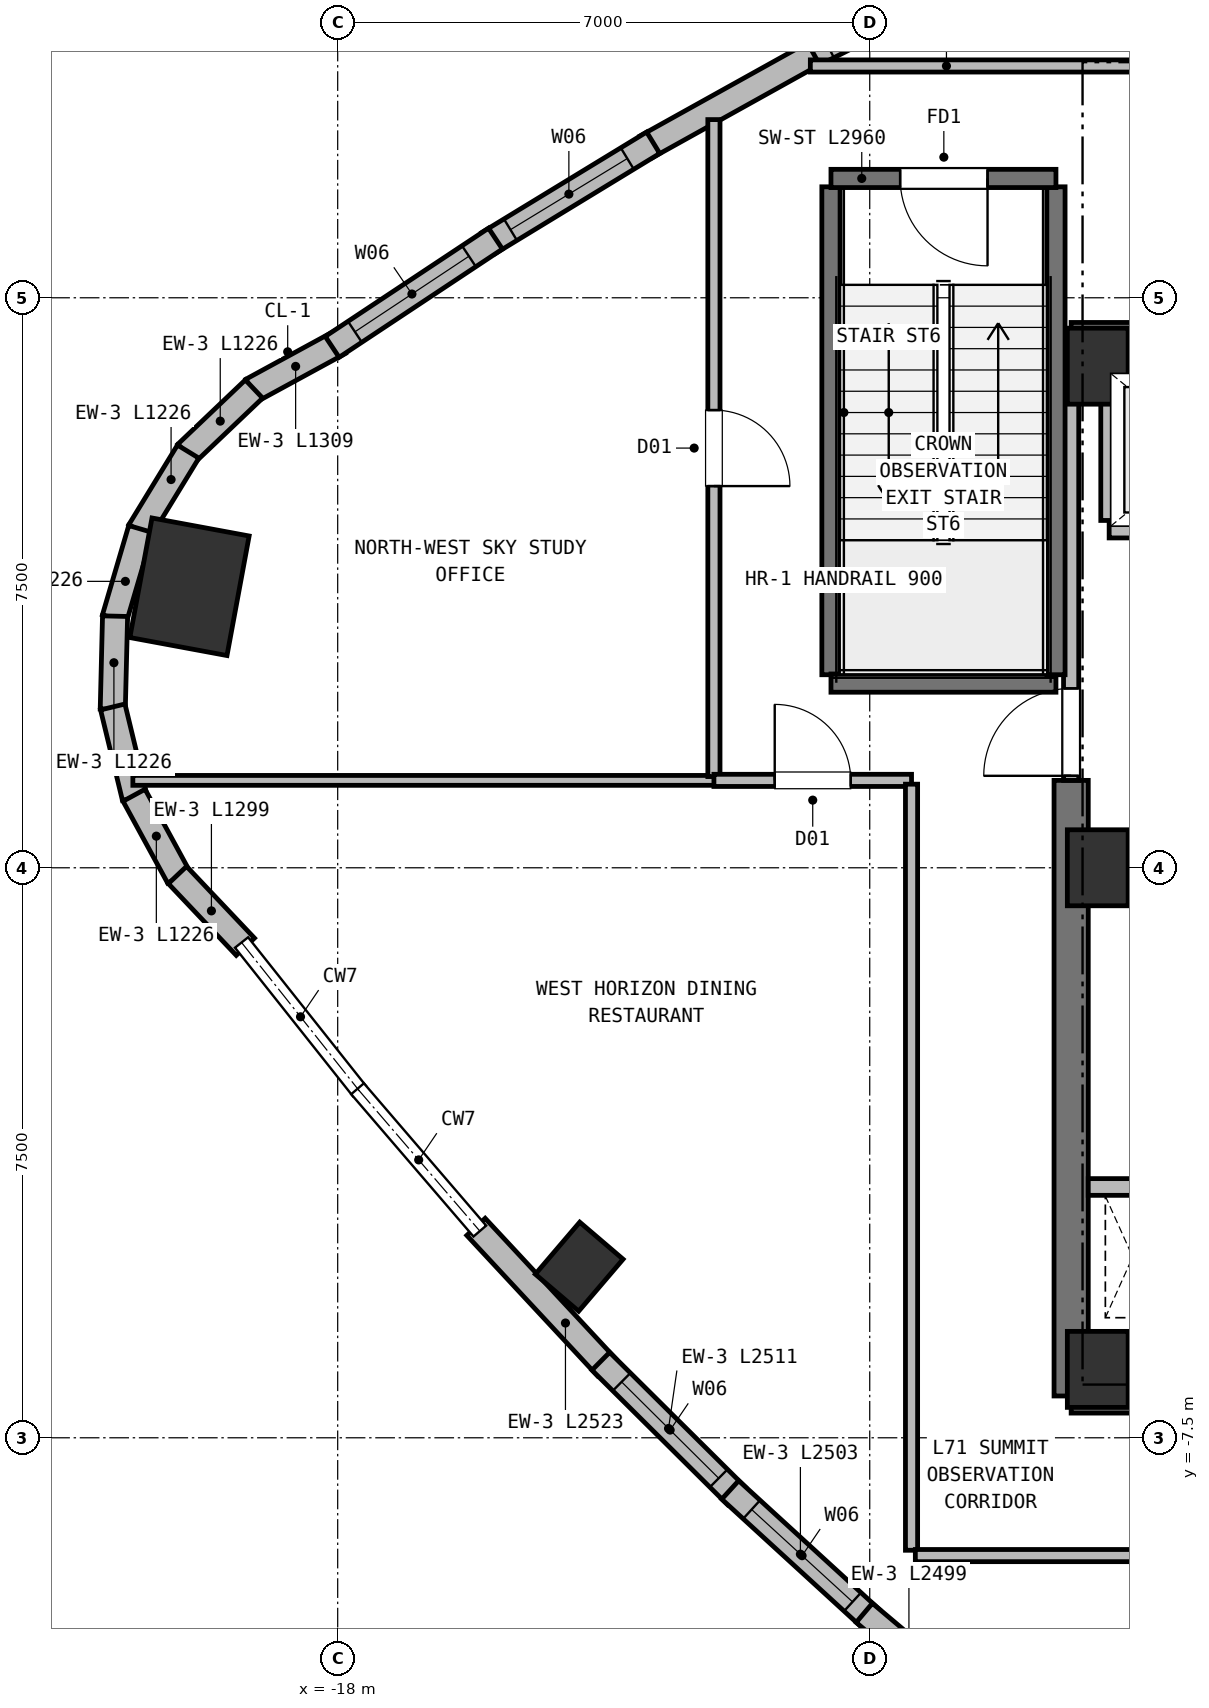
"""IFC4 building model, lengths in metres.
Left out: names, types, materials, properties, quantities, classifications, styles, units other than length and angle.
Written with IfcOpenShell. Run it as: python <this file> out.ifc"""

import sys

from ifc_helpers import new_model, si_unit, direction, frame, frame_2d, origin, origin_2d, place, context, subcontext, project, spatial, rectangle, extrude, element, fill, save


model = new_model("IFC4")
c1 = context("Model", 3, precision=1e-05, world=origin(), true_north=direction((0.0, 1.0)))
c2 = subcontext(c1, "Body", "Model", "MODEL_VIEW")
j1 = project(units=[si_unit("LENGTHUNIT", "METRE"), si_unit("PLANEANGLEUNIT", "RADIAN")], contexts=[c1])
p1 = place(None, origin())
s1 = spatial("IfcSite", under=j1, at=p1, CompositionType="ELEMENT")
p2 = place(p1, origin())
s2 = spatial("IfcBuilding", under=s1, at=p2, CompositionType="ELEMENT")
p3 = place(p2, frame((0.0, 0.0, 286.0)))
s3 = spatial("IfcBuildingStorey", under=s2, at=p3, CompositionType="ELEMENT", Elevation=286.0)
for number, where, z_axis, x_axis in (
    (1, (-8.0, -6.6, 0.0), (0.0, 0.0, 1.0), (1.0, 0.0, 0.0)),
    (2, (-8.0, 6.6, 0.0), (0.0, 0.0, 1.0), (1.0, 0.0, 0.0)),
    (3, (-8.0, 0.0, 0.0), (0.0, 0.0, 1.0), (1.0, 0.0, 0.0)),
):
    element("IfcColumn", number, at=place(p3, frame(where, z_axis=z_axis, x_axis=x_axis)), inside=s3, PredefinedType="COLUMN", context=c2, shape_type="SweptSolid", body=[
        extrude(rectangle(XDim=0.8, YDim=1.0, at=origin_2d()), origin(), (0.0, 0.0, 1.0), 4.4),
    ])
p4 = place(p3, frame((-8.35, 6.95, 0.0), z_axis=(0.0, 0.0, 1.0), x_axis=(1.0, 0.0, 0.0)))
e4 = element("IfcWall", 4, at=p4, inside=s3, PredefinedType="SHEAR", context=c2, shape_type="SweptSolid", body=[
    extrude(rectangle(XDim=16.7, YDim=0.45, at=frame_2d((8.35, 0.0))), origin(), (0.0, 0.0, 1.0), 4.13),
])
p5 = place(p3, frame((-8.35, -6.95, 0.0), z_axis=(0.0, 0.0, 1.0), x_axis=(1.0, 0.0, 0.0)))
e5 = element("IfcWall", 5, at=p5, inside=s3, PredefinedType="SHEAR", context=c2, shape_type="SweptSolid", body=[
    extrude(rectangle(XDim=3.95, YDim=0.45, at=frame_2d((1.975, 0.0))), origin(), (0.0, 0.0, 1.0), 4.13),
])
p6 = place(p3, frame((-8.35, -6.95, 0.0), z_axis=(0.0, 0.0, 1.0), x_axis=(0.0, 1.0, 0.0)))
e6 = element("IfcWall", 6, at=p6, inside=s3, PredefinedType="SHEAR", context=c2, shape_type="SweptSolid", body=[
    extrude(rectangle(XDim=8.1, YDim=0.45, at=frame_2d((4.05, 0.0))), origin(), (0.0, 0.0, 1.0), 4.13),
])
p7 = place(p3, frame((-19.95, 3.698, 0.0), z_axis=(0.0, 0.0, 1.0), x_axis=(-0.983254907564, 0.182235525492, 0.0)))
e7 = element("IfcColumn", 7, at=p7, inside=s3, PredefinedType="COLUMN", context=c2, shape_type="SweptSolid", body=[
    extrude(rectangle(XDim=1.3, YDim=1.6, at=origin_2d()), origin(), (0.0, 0.0, 1.0), 4.4),
])
p8 = place(p3, frame((-14.823, -5.249, 0.0), z_axis=(0.0, 0.0, 1.0), x_axis=(-0.7604059656, 0.64944804833, 0.0)))
e8 = element("IfcColumn", 8, at=p8, inside=s3, PredefinedType="COLUMN", context=c2, shape_type="SweptSolid", body=[
    extrude(rectangle(XDim=0.75, YDim=0.9, at=origin_2d()), origin(), (0.0, 0.0, 1.0), 4.4),
])
p9 = place(p3, frame((-19.128, 6.284, 0.0), z_axis=(0.0, 0.0, 1.0), x_axis=(0.878173375728, 0.478342473719, 0.0)))
e9 = element("IfcWall", 9, at=p9, inside=s3, PredefinedType="SOLIDWALL", context=c2, shape_type="SweptSolid", body=[
    extrude(rectangle(XDim=1.309, YDim=0.33, at=frame_2d((0.655, 0.0))), origin(), (0.0, 0.0, 1.0), 4.13),
])
for number, where, z_axis, x_axis in (
    (10, (-19.989, 5.454, 0.0), (0.0, 0.0, 1.0), (0.724, 0.69, 0.0)),
    (11, (-20.606, 4.43, 0.0), (0.0, 0.0, 1.0), (0.521, 0.853, 0.0)),
    (12, (-20.937, 3.281, 0.0), (0.0, 0.0, 1.0), (0.282, 0.959, 0.0)),
    (13, (-20.959, 2.085, 0.0), (0.0, 0.0, 1.0), (0.025, 1.0, 0.0)),
    (14, (-20.671, 0.924, 0.0), (0.0, 0.0, 1.0), (-0.235, 0.972, 0.0)),
):
    element("IfcWall", number, at=place(p3, frame(where, z_axis=z_axis, x_axis=x_axis)), inside=s3, PredefinedType="SOLIDWALL", context=c2, shape_type="SweptSolid", body=[
        extrude(rectangle(XDim=1.226, YDim=0.33, at=frame_2d((0.613, 0.0))), origin(), (0.0, 0.0, 1.0), 4.13),
    ])
p10 = place(p3, frame((-20.093, -0.122, 0.0), z_axis=(0.0, 0.0, 1.0), x_axis=(-0.478321862725, 0.878184602256, 0.0)))
e15 = element("IfcWall", 15, at=p10, inside=s3, PredefinedType="SOLIDWALL", context=c2, shape_type="SweptSolid", body=[
    extrude(rectangle(XDim=1.226, YDim=0.33, at=frame_2d((0.613, 0.0))), origin(), (0.0, 0.0, 1.0), 4.13),
])
p11 = place(p3, frame((-19.215, -1.039, 0.0), z_axis=(0.0, 0.0, 1.0), x_axis=(-0.687489239636, 0.726194564414, 0.0)))
e16 = element("IfcWall", 16, at=p11, inside=s3, PredefinedType="SOLIDWALL", context=c2, shape_type="SweptSolid", body=[
    extrude(rectangle(XDim=1.299, YDim=0.33, at=frame_2d((0.65, 0.0))), origin(), (0.0, 0.0, 1.0), 4.13),
])
p12 = place(p3, frame((-14.462, -6.572, 0.0), z_axis=(0.0, 0.0, 1.0), x_axis=(-0.681100323402, 0.732190104728, 0.0)))
e17 = element("IfcWall", 17, at=p12, inside=s3, PredefinedType="SOLIDWALL", context=c2, shape_type="SweptSolid", body=[
    extrude(rectangle(XDim=2.523, YDim=0.33, at=frame_2d((1.262, 0.0))), origin(), (0.0, 0.0, 1.0), 4.13),
])
p13 = place(p3, frame((-12.756, -8.262, 0.0), z_axis=(0.0, 0.0, 1.0), x_axis=(-0.709823779942, 0.704379302243, 0.0)))
e18 = element("IfcWall", 18, at=p13, inside=s3, PredefinedType="SOLIDWALL", context=c2, shape_type="SweptSolid", body=[
    extrude(rectangle(XDim=2.511, YDim=0.33, at=frame_2d((1.256, 0.0))), origin(), (0.0, 0.0, 1.0), 4.13),
])
p14 = place(p13, frame((0.326, 0.0, 0.72)))
e19 = element("IfcOpeningElement", 19, at=p14, cuts=e18, PredefinedType="OPENING", context=c2, shape_type="SweptSolid", body=[
    extrude(rectangle(XDim=1.8, YDim=2.25, at=frame_2d((0.9, 1.125))), frame((0.0, 0.175, 0.0), z_axis=(0.0, -1.0, 0.0), x_axis=(1.0, 0.0, 0.0)), (0.0, 0.0, 1.0), 0.35),
])
p15 = place(p3, frame((-10.989, -9.876, 0.0), z_axis=(0.0, 0.0, 1.0), x_axis=(-0.737627628948, 0.675207731748, 0.0)))
e20 = element("IfcWall", 20, at=p15, inside=s3, PredefinedType="SOLIDWALL", context=c2, shape_type="SweptSolid", body=[
    extrude(rectangle(XDim=2.503, YDim=0.33, at=frame_2d((1.251, 0.0))), origin(), (0.0, 0.0, 1.0), 4.13),
])
p16 = place(p15, frame((0.322, 0.0, 0.72)))
e21 = element("IfcOpeningElement", 21, at=p16, cuts=e20, PredefinedType="OPENING", context=c2, shape_type="SweptSolid", body=[
    extrude(rectangle(XDim=1.8, YDim=2.25, at=frame_2d((0.9, 1.125))), frame((0.0, 0.175, 0.0), z_axis=(0.0, -1.0, 0.0), x_axis=(1.0, 0.0, 0.0)), (0.0, 0.0, 1.0), 0.35),
])
p17 = place(p3, frame((-9.161, -11.415, 0.0), z_axis=(0.0, 0.0, 1.0), x_axis=(-0.764315556833, 0.644842406781, 0.0)))
e22 = element("IfcWall", 22, at=p17, inside=s3, PredefinedType="SOLIDWALL", context=c2, shape_type="SweptSolid", body=[
    extrude(rectangle(XDim=2.499, YDim=0.33, at=frame_2d((1.25, 0.0))), origin(), (0.0, 0.0, 1.0), 4.13),
])
p18 = place(p3, frame((-11.836, 10.659, 0.0), z_axis=(0.0, 0.0, 1.0), x_axis=(0.892552621867, 0.450943252747, 0.0)))
e23 = element("IfcWall", 23, at=p18, inside=s3, PredefinedType="SOLIDWALL", context=c2, shape_type="SweptSolid", body=[
    extrude(rectangle(XDim=2.511, YDim=0.33, at=frame_2d((1.255, 0.0))), origin(), (0.0, 0.0, 1.0), 4.13),
])
p19 = place(p18, frame((0.325, 0.0, 0.72)))
e24 = element("IfcOpeningElement", 24, at=p19, cuts=e23, PredefinedType="OPENING", context=c2, shape_type="SweptSolid", body=[
    extrude(rectangle(XDim=1.8, YDim=2.25, at=frame_2d((0.9, 1.125))), frame((0.0, 0.175, 0.0), z_axis=(0.0, -1.0, 0.0), x_axis=(1.0, 0.0, 0.0)), (0.0, 0.0, 1.0), 0.35),
])
p20 = place(p3, frame((-13.944, 9.485, 0.0), z_axis=(0.0, 0.0, 1.0), x_axis=(0.873960918974, 0.485996205856, 0.0)))
e25 = element("IfcWall", 25, at=p20, inside=s3, PredefinedType="SOLIDWALL", context=c2, shape_type="SweptSolid", body=[
    extrude(rectangle(XDim=2.523, YDim=0.33, at=frame_2d((1.261, 0.0))), origin(), (0.0, 0.0, 1.0), 4.13),
])
p21 = place(p3, frame((-16.017, 8.219, 0.0), z_axis=(0.0, 0.0, 1.0), x_axis=(0.854010909552, 0.520255097395, 0.0)))
e26 = element("IfcWall", 26, at=p21, inside=s3, PredefinedType="SOLIDWALL", context=c2, shape_type="SweptSolid", body=[
    extrude(rectangle(XDim=2.538, YDim=0.33, at=frame_2d((1.269, 0.0))), origin(), (0.0, 0.0, 1.0), 4.13),
])
p22 = place(p21, frame((0.339, 0.0, 0.72)))
e27 = element("IfcOpeningElement", 27, at=p22, cuts=e26, PredefinedType="OPENING", context=c2, shape_type="SweptSolid", body=[
    extrude(rectangle(XDim=1.8, YDim=2.25, at=frame_2d((0.9, 1.125))), frame((0.0, 0.175, 0.0), z_axis=(0.0, -1.0, 0.0), x_axis=(1.0, 0.0, 0.0)), (0.0, 0.0, 1.0), 0.35),
])
p23 = place(p3, frame((-18.073, 6.854, 0.0), z_axis=(0.0, 0.0, 1.0), x_axis=(0.833460819708, 0.552578557322, 0.0)))
e28 = element("IfcWall", 28, at=p23, inside=s3, PredefinedType="SOLIDWALL", context=c2, shape_type="SweptSolid", body=[
    extrude(rectangle(XDim=2.578, YDim=0.33, at=frame_2d((1.289, 0.0))), origin(), (0.0, 0.0, 1.0), 4.13),
])
p24 = place(p23, frame((0.359, 0.0, 0.72)))
e29 = element("IfcOpeningElement", 29, at=p24, cuts=e28, PredefinedType="OPENING", context=c2, shape_type="SweptSolid", body=[
    extrude(rectangle(XDim=1.8, YDim=2.25, at=frame_2d((0.9, 1.125))), frame((0.0, 0.175, 0.0), z_axis=(0.0, -1.0, 0.0), x_axis=(1.0, 0.0, 0.0)), (0.0, 0.0, 1.0), 0.35),
])
p25 = place(p3, frame((-7.6, -6.27, 0.0), z_axis=(0.0, 0.0, 1.0), x_axis=(1.0, 0.0, 0.0)))
e30 = element("IfcWall", 30, at=p25, inside=s3, PredefinedType="SHEAR", context=c2, shape_type="SweptSolid", body=[
    extrude(rectangle(XDim=3.59, YDim=0.24, at=frame_2d((1.795, 0.0))), origin(), (0.0, 0.0, 1.0), 4.13),
])
p26 = place(p3, frame((-8.125, -4.2, 0.0), z_axis=(0.0, 0.0, 1.0), x_axis=(1.0, 0.0, 0.0)))
e31 = element("IfcWall", 31, at=p26, inside=s3, PredefinedType="PARTITIONING", context=c2, shape_type="SweptSolid", body=[
    extrude(rectangle(XDim=1.035, YDim=0.22, at=frame_2d((0.518, 0.0))), origin(), (0.0, 0.0, 1.0), 4.13),
])
p27 = place(p3, frame((-7.85, 4.45, 0.0), z_axis=(0.0, 0.0, 1.0), x_axis=(1.0, 0.0, 0.0)))
e32 = element("IfcWall", 32, at=p27, inside=s3, PredefinedType="PARTITIONING", context=c2, shape_type="SweptSolid", body=[
    extrude(rectangle(XDim=2.5, YDim=0.22, at=frame_2d((1.25, 0.0))), origin(), (0.0, 0.0, 1.0), 4.13),
])
p28 = place(p27, frame((0.66, 0.0, 0.0)))
e33 = element("IfcOpeningElement", 33, at=p28, cuts=e32, PredefinedType="OPENING", context=c2, shape_type="SweptSolid", body=[
    extrude(rectangle(XDim=1.18, YDim=2.15, at=frame_2d((0.59, 1.075))), frame((0.0, 0.12, 0.0), z_axis=(0.0, -1.0, 0.0), x_axis=(1.0, 0.0, 0.0)), (0.0, 0.0, 1.0), 0.24),
])
p29 = place(p3, frame((-7.85, 4.57, 0.0), z_axis=(0.0, 0.0, 1.0), x_axis=(0.0, 1.0, 0.0)))
e34 = element("IfcWall", 34, at=p29, inside=s3, PredefinedType="PARTITIONING", context=c2, shape_type="SweptSolid", body=[
    extrude(rectangle(XDim=2.155, YDim=0.22, at=frame_2d((1.078, 0.0))), origin(), (0.0, 0.0, 1.0), 3.81),
])
p30 = place(p3, frame((-8.35, 1.15, 0.0), z_axis=(0.0, 0.0, 1.0), x_axis=(0.0, 1.0, 0.0)))
e35 = element("IfcWall", 35, at=p30, inside=s3, PredefinedType="PARTITIONING", context=c2, shape_type="SweptSolid", body=[
    extrude(rectangle(XDim=5.4, YDim=0.2, at=frame_2d((2.7, 0.0))), origin(), (0.0, 0.0, 1.0), 4.13),
])
p31 = place(p30, frame((0.06, 0.0, 0.0)))
e36 = element("IfcOpeningElement", 36, at=p31, cuts=e35, PredefinedType="OPENING", context=c2, shape_type="SweptSolid", body=[
    extrude(rectangle(XDim=1.15, YDim=2.15, at=frame_2d((0.575, 1.075))), frame((0.0, 0.11, 0.0), z_axis=(0.0, -1.0, 0.0), x_axis=(1.0, 0.0, 0.0)), (0.0, 0.0, 1.0), 0.22),
])
p32 = place(p3, frame((-11.51, 2.54, 0.0), z_axis=(0.0, 0.0, 1.0), x_axis=(0.0, 1.0, 0.0)))
e37 = element("IfcWall", 37, at=p32, inside=s3, PredefinedType="SHEAR", context=c2, shape_type="SweptSolid", body=[
    extrude(rectangle(XDim=6.42, YDim=0.24, at=frame_2d((3.21, 0.0))), origin(), (0.0, 0.0, 1.0), 4.13),
])
p33 = place(p3, frame((-11.51, 2.43, 0.0), z_axis=(0.0, 0.0, 1.0), x_axis=(1.0, 0.0, 0.0)))
e38 = element("IfcWall", 38, at=p33, inside=s3, PredefinedType="SHEAR", context=c2, shape_type="SweptSolid", body=[
    extrude(rectangle(XDim=2.96, YDim=0.24, at=frame_2d((1.48, 0.0))), origin(), (0.0, 0.0, 1.0), 4.13),
])
p34 = place(p3, frame((-8.55, 2.54, 0.0), z_axis=(0.0, 0.0, 1.0), x_axis=(0.0, 1.0, 0.0)))
e39 = element("IfcWall", 39, at=p34, inside=s3, PredefinedType="SHEAR", context=c2, shape_type="SweptSolid", body=[
    extrude(rectangle(XDim=6.42, YDim=0.24, at=frame_2d((3.21, 0.0))), origin(), (0.0, 0.0, 1.0), 4.13),
])
p35 = place(p3, frame((-8.55, 9.07, 0.0), z_axis=(0.0, 0.0, 1.0), x_axis=(-1.0, 0.0, 0.0)))
e40 = element("IfcWall", 40, at=p35, inside=s3, PredefinedType="SHEAR", context=c2, shape_type="SweptSolid", body=[
    extrude(rectangle(XDim=2.96, YDim=0.24, at=frame_2d((1.48, 0.0))), origin(), (0.0, 0.0, 1.0), 4.13),
])
p36 = place(p35, frame((0.9, 0.0, 0.0)))
e41 = element("IfcOpeningElement", 41, at=p36, cuts=e40, PredefinedType="OPENING", context=c2, shape_type="SweptSolid", body=[
    extrude(rectangle(XDim=1.15, YDim=2.15, at=frame_2d((0.575, 1.075))), frame((0.0, 0.13, 0.0), z_axis=(0.0, -1.0, 0.0), x_axis=(1.0, 0.0, 0.0)), (0.0, 0.0, 1.0), 0.26),
])
p37 = place(p3, frame((-20.695, 1.15, 0.0), z_axis=(0.0, 0.0, 1.0), x_axis=(1.0, 0.0, 0.0)))
e42 = element("IfcWall", 42, at=p37, inside=s3, PredefinedType="PARTITIONING", context=c2, shape_type="SweptSolid", body=[
    extrude(rectangle(XDim=7.695, YDim=0.13, at=frame_2d((3.847, 0.0))), origin(), (0.0, 0.0, 1.0), 4.13),
])
p38 = place(p3, frame((-7.12, 10.55, 0.0), z_axis=(0.0, 0.0, 1.0), x_axis=(-1.0, 0.0, 0.0)))
e43 = element("IfcWall", 43, at=p38, inside=s3, PredefinedType="PARTITIONING", context=c2, shape_type="SweptSolid", body=[
    extrude(rectangle(XDim=4.661, YDim=0.16, at=frame_2d((2.331, 0.0))), origin(), (0.0, 0.0, 1.0), 4.13),
])
p39 = place(p3, frame((-13.05, 9.844, 0.0), z_axis=(0.0, 0.0, 1.0), x_axis=(0.0, -1.0, 0.0)))
e44 = element("IfcWall", 44, at=p39, inside=s3, PredefinedType="PARTITIONING", context=c2, shape_type="SweptSolid", body=[
    extrude(rectangle(XDim=8.645, YDim=0.16, at=frame_2d((4.322, 0.0))), origin(), (0.0, 0.0, 1.0), 4.13),
])
p40 = place(p39, frame((3.822, 0.0, 0.0)))
e45 = element("IfcOpeningElement", 45, at=p40, cuts=e44, PredefinedType="OPENING", context=c2, shape_type="SweptSolid", body=[
    extrude(rectangle(XDim=1.0, YDim=2.15, at=frame_2d((0.5, 1.075))), frame((0.0, 0.09, 0.0), z_axis=(0.0, -1.0, 0.0), x_axis=(1.0, 0.0, 0.0)), (0.0, 0.0, 1.0), 0.18),
])
p41 = place(p3, frame((-13.05, 1.15, 0.0), z_axis=(0.0, 0.0, 1.0), x_axis=(1.0, 0.0, 0.0)))
e46 = element("IfcWall", 46, at=p41, inside=s3, PredefinedType="PARTITIONING", context=c2, shape_type="SweptSolid", body=[
    extrude(rectangle(XDim=2.6, YDim=0.16, at=frame_2d((1.3, 0.0))), origin(), (0.0, 0.0, 1.0), 3.71),
])
p42 = place(p41, frame((0.8, 0.0, 0.0)))
e47 = element("IfcOpeningElement", 47, at=p42, cuts=e46, PredefinedType="OPENING", context=c2, shape_type="SweptSolid", body=[
    extrude(rectangle(XDim=1.0, YDim=2.15, at=frame_2d((0.5, 1.075))), frame((0.0, 0.09, 0.0), z_axis=(0.0, -1.0, 0.0), x_axis=(1.0, 0.0, 0.0)), (0.0, 0.0, 1.0), 0.18),
])
p43 = place(p3, frame((-10.45, 1.1, 0.0), z_axis=(0.0, 0.0, 1.0), x_axis=(0.0, -1.0, 0.0)))
e48 = element("IfcWall", 48, at=p43, inside=s3, PredefinedType="PARTITIONING", context=c2, shape_type="SweptSolid", body=[
    extrude(rectangle(XDim=10.08, YDim=0.16, at=frame_2d((5.04, 0.0))), origin(), (0.0, 0.0, 1.0), 4.13),
])
p44 = place(p3, frame((-10.4, -9.05, 0.0), z_axis=(0.0, 0.0, 1.0), x_axis=(1.0, 0.0, 0.0)))
e49 = element("IfcWall", 49, at=p44, inside=s3, PredefinedType="PARTITIONING", context=c2, shape_type="SweptSolid", body=[
    extrude(rectangle(XDim=19.1, YDim=0.16, at=frame_2d((9.55, 0.0))), origin(), (0.0, 0.0, 1.0), 4.13),
])
p45 = place(p44, frame((3.73, 0.0, 0.0)))
e50 = element("IfcOpeningElement", 50, at=p45, cuts=e49, PredefinedType="OPENING", context=c2, shape_type="SweptSolid", body=[
    extrude(rectangle(XDim=1.0, YDim=2.15, at=frame_2d((0.5, 1.075))), frame((0.0, 0.09, 0.0), z_axis=(0.0, -1.0, 0.0), x_axis=(1.0, 0.0, 0.0)), (0.0, 0.0, 1.0), 0.18),
])
p46 = place(p44, frame((11.4, 0.0, 0.0)))
e51 = element("IfcOpeningElement", 51, at=p46, cuts=e49, PredefinedType="OPENING", context=c2, shape_type="SweptSolid", body=[
    extrude(rectangle(XDim=1.0, YDim=2.15, at=frame_2d((0.5, 1.075))), frame((0.0, 0.09, 0.0), z_axis=(0.0, -1.0, 0.0), x_axis=(1.0, 0.0, 0.0)), (0.0, 0.0, 1.0), 0.18),
])
p47 = place(p44, frame((16.745, 0.0, 0.0)))
e52 = element("IfcOpeningElement", 52, at=p47, cuts=e49, PredefinedType="OPENING", context=c2, shape_type="SweptSolid", body=[
    extrude(rectangle(XDim=0.95, YDim=2.1, at=frame_2d((0.475, 1.05))), frame((0.0, 0.09, 0.0), z_axis=(0.0, -1.0, 0.0), x_axis=(1.0, 0.0, 0.0)), (0.0, 0.0, 1.0), 0.18),
])
p48 = place(p14, origin())
e53 = element("IfcWindow", 53, at=p48, inside=s3, PartitioningType="SINGLE_PANEL", PredefinedType="WINDOW", context=c2, shape_type="SweptSolid", body=[
    extrude(rectangle(XDim=1.8, YDim=2.25, at=frame_2d((0.9, 1.125))), frame((0.0, 0.03, 0.0), z_axis=(0.0, -1.0, 0.0), x_axis=(1.0, 0.0, 0.0)), (0.0, 0.0, 1.0), 0.06),
])
fill(e19, e53)
p49 = place(p16, origin())
e54 = element("IfcWindow", 54, at=p49, inside=s3, PartitioningType="SINGLE_PANEL", PredefinedType="WINDOW", context=c2, shape_type="SweptSolid", body=[
    extrude(rectangle(XDim=1.8, YDim=2.25, at=frame_2d((0.9, 1.125))), frame((0.0, 0.03, 0.0), z_axis=(0.0, -1.0, 0.0), x_axis=(1.0, 0.0, 0.0)), (0.0, 0.0, 1.0), 0.06),
])
fill(e21, e54)
p50 = place(p22, origin())
e55 = element("IfcWindow", 55, at=p50, inside=s3, PartitioningType="SINGLE_PANEL", PredefinedType="WINDOW", context=c2, shape_type="SweptSolid", body=[
    extrude(rectangle(XDim=1.8, YDim=2.25, at=frame_2d((0.9, 1.125))), frame((0.0, 0.03, 0.0), z_axis=(0.0, -1.0, 0.0), x_axis=(1.0, 0.0, 0.0)), (0.0, 0.0, 1.0), 0.06),
])
fill(e27, e55)
p51 = place(p24, origin())
e56 = element("IfcWindow", 56, at=p51, inside=s3, PartitioningType="SINGLE_PANEL", PredefinedType="WINDOW", context=c2, shape_type="SweptSolid", body=[
    extrude(rectangle(XDim=1.8, YDim=2.25, at=frame_2d((0.9, 1.125))), frame((0.0, 0.03, 0.0), z_axis=(0.0, -1.0, 0.0), x_axis=(1.0, 0.0, 0.0)), (0.0, 0.0, 1.0), 0.06),
])
fill(e29, e56)
p52 = place(p31, origin())
e57 = element("IfcDoor", 57, at=p52, inside=s3, OperationType="SINGLE_SWING_LEFT", PredefinedType="DOOR", context=c2, shape_type="SweptSolid", body=[
    extrude(rectangle(XDim=1.15, YDim=2.15, at=frame_2d((0.575, 1.075))), frame((0.0, 0.025, 0.0), z_axis=(0.0, -1.0, 0.0), x_axis=(1.0, 0.0, 0.0)), (0.0, 0.0, 1.0), 0.05),
])
fill(e36, e57)
p53 = place(p36, origin())
e58 = element("IfcDoor", 58, at=p53, inside=s3, OperationType="SINGLE_SWING_LEFT", PredefinedType="DOOR", context=c2, shape_type="SweptSolid", body=[
    extrude(rectangle(XDim=1.15, YDim=2.15, at=frame_2d((0.575, 1.075))), frame((0.0, 0.025, 0.0), z_axis=(0.0, -1.0, 0.0), x_axis=(1.0, 0.0, 0.0)), (0.0, 0.0, 1.0), 0.05),
])
fill(e41, e58)
p54 = place(p42, origin())
e59 = element("IfcDoor", 59, at=p54, inside=s3, OperationType="SINGLE_SWING_LEFT", PredefinedType="DOOR", context=c2, shape_type="SweptSolid", body=[
    extrude(rectangle(XDim=1.0, YDim=2.15, at=frame_2d((0.5, 1.075))), frame((0.0, 0.025, 0.0), z_axis=(0.0, -1.0, 0.0), x_axis=(1.0, 0.0, 0.0)), (0.0, 0.0, 1.0), 0.05),
])
fill(e47, e59)
p55 = place(p40, origin())
e60 = element("IfcDoor", 60, at=p55, inside=s3, OperationType="SINGLE_SWING_RIGHT", PredefinedType="DOOR", context=c2, shape_type="SweptSolid", body=[
    extrude(rectangle(XDim=1.0, YDim=2.15, at=frame_2d((0.5, 1.075))), frame((0.0, 0.025, 0.0), z_axis=(0.0, -1.0, 0.0), x_axis=(1.0, 0.0, 0.0)), (0.0, 0.0, 1.0), 0.05),
])
fill(e45, e60)
save(model, sys.argv[1])
